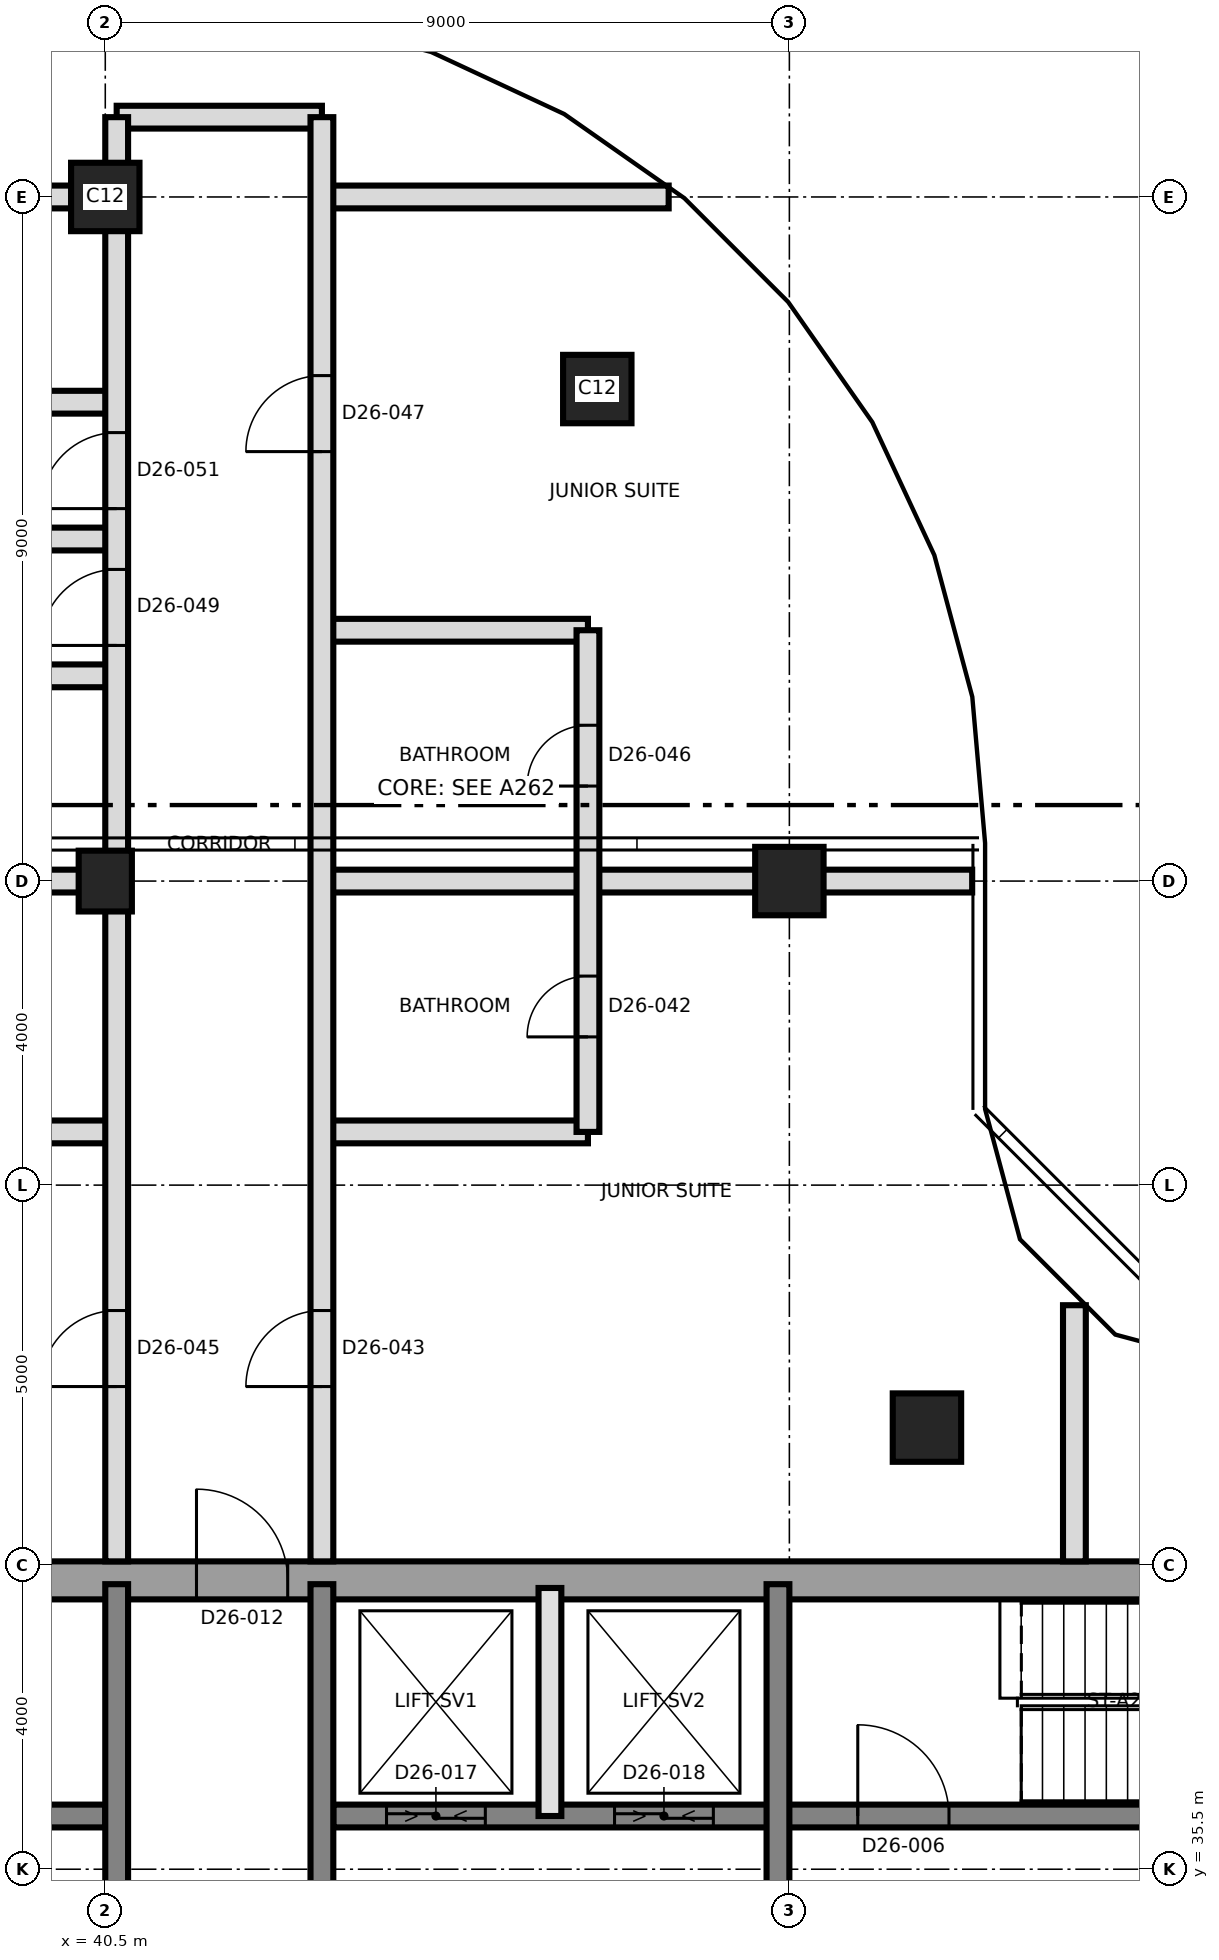
"""IFC4 building model, lengths in metres.
Left out: names, types, materials, properties, quantities, classifications, styles, units other than length and angle.
Written with IfcOpenShell. Run it as: python <this file> out.ifc"""

import sys

from ifc_helpers import new_model, si_unit, direction, frame, frame_2d, origin, origin_2d, place, context, subcontext, project, spatial, rectangle, extrude, element, fill, save


model = new_model("IFC4")
c1 = context("Model", 3, precision=1e-05, world=origin(), true_north=direction((0.0, 1.0)))
c2 = subcontext(c1, "Body", "Model", "MODEL_VIEW")
j1 = project(units=[si_unit("LENGTHUNIT", "METRE"), si_unit("PLANEANGLEUNIT", "RADIAN")], contexts=[c1])
p1 = place(None, origin())
s1 = spatial("IfcSite", under=j1, at=p1, CompositionType="ELEMENT")
p2 = place(p1, origin())
s2 = spatial("IfcBuilding", under=s1, at=p2, CompositionType="ELEMENT")
p3 = place(p2, frame((0.0, 0.0, 236.5)))
s3 = spatial("IfcBuildingStorey", under=s2, at=p3, CompositionType="ELEMENT", Elevation=236.5)
p4 = place(p3, frame((31.25, 39.3, 0.0), z_axis=(0.0, 0.0, 1.0), x_axis=(1.0, 0.0, 0.0)))
e1 = element("IfcWall", 1, at=p4, inside=s3, PredefinedType="SHEAR", context=c2, shape_type="SweptSolid", body=[
    extrude(rectangle(XDim=27.0, YDim=0.5, at=frame_2d((13.5, 0.0))), origin(), (0.0, 0.0, 1.0), 3.7),
])
p5 = place(p4, frame((10.45, 0.0, 0.0)))
e2 = element("IfcOpeningElement", 2, at=p5, cuts=e1, PredefinedType="OPENING", context=c2, shape_type="SweptSolid", body=[
    extrude(rectangle(XDim=1.2, YDim=2.1, at=frame_2d((0.6, 1.05))), frame((0.0, 0.26, 0.0), z_axis=(0.0, -1.0, 0.0), x_axis=(1.0, 0.0, 0.0)), (0.0, 0.0, 1.0), 0.52),
])
p6 = place(p3, frame((31.75, 36.2, 0.0), z_axis=(0.0, 0.0, 1.0), x_axis=(1.0, 0.0, 0.0)))
e3 = element("IfcWall", 3, at=p6, inside=s3, PredefinedType="SHEAR", context=c2, shape_type="SweptSolid", body=[
    extrude(rectangle(XDim=8.75, YDim=0.3, at=frame_2d((4.375, 0.0))), origin(), (0.0, 0.0, 1.0), 3.7),
])
p7 = place(p6, frame((6.65, 0.0, 0.0)))
e4 = element("IfcOpeningElement", 4, at=p7, cuts=e3, PredefinedType="OPENING", context=c2, shape_type="SweptSolid", body=[
    extrude(rectangle(XDim=1.2, YDim=2.1, at=frame_2d((0.6, 1.05))), frame((0.0, 0.16, 0.0), z_axis=(0.0, -1.0, 0.0), x_axis=(1.0, 0.0, 0.0)), (0.0, 0.0, 1.0), 0.32),
])
p8 = place(p3, frame((43.5, 36.2, 0.0), z_axis=(0.0, 0.0, 1.0), x_axis=(1.0, 0.0, 0.0)))
e5 = element("IfcWall", 5, at=p8, inside=s3, PredefinedType="SHEAR", context=c2, shape_type="SweptSolid", body=[
    extrude(rectangle(XDim=14.75, YDim=0.3, at=frame_2d((7.375, 0.0))), origin(), (0.0, 0.0, 1.0), 3.7),
])
p9 = place(p8, frame((6.9, 0.0, 0.0)))
e6 = element("IfcOpeningElement", 6, at=p9, cuts=e5, PredefinedType="OPENING", context=c2, shape_type="SweptSolid", body=[
    extrude(rectangle(XDim=1.2, YDim=2.1, at=frame_2d((0.6, 1.05))), frame((0.0, 0.16, 0.0), z_axis=(0.0, -1.0, 0.0), x_axis=(1.0, 0.0, 0.0)), (0.0, 0.0, 1.0), 0.32),
])
p10 = place(p8, frame((0.7, 0.0, 0.0)))
e7 = element("IfcOpeningElement", 7, at=p10, cuts=e5, PredefinedType="OPENING", context=c2, shape_type="SweptSolid", body=[
    extrude(rectangle(XDim=1.3, YDim=2.4, at=frame_2d((0.65, 1.2))), frame((0.0, 0.16, 0.0), z_axis=(0.0, -1.0, 0.0), x_axis=(1.0, 0.0, 0.0)), (0.0, 0.0, 1.0), 0.32),
])
p11 = place(p8, frame((3.7, 0.0, 0.0)))
e8 = element("IfcOpeningElement", 8, at=p11, cuts=e5, PredefinedType="OPENING", context=c2, shape_type="SweptSolid", body=[
    extrude(rectangle(XDim=1.3, YDim=2.4, at=frame_2d((0.65, 1.2))), frame((0.0, 0.16, 0.0), z_axis=(0.0, -1.0, 0.0), x_axis=(1.0, 0.0, 0.0)), (0.0, 0.0, 1.0), 0.32),
])
for number, where, z_axis, x_axis in (
    (9, (40.65, 33.5, 0.0), (0.0, 0.0, 1.0), (0.0, 1.0, 0.0)),
    (10, (43.35, 33.5, 0.0), (0.0, 0.0, 1.0), (0.0, 1.0, 0.0)),
    (11, (49.35, 33.5, 0.0), (0.0, 0.0, 1.0), (0.0, 1.0, 0.0)),
):
    element("IfcWall", number, at=place(p3, frame(where, z_axis=z_axis, x_axis=x_axis)), inside=s3, PredefinedType="SHEAR", context=c2, shape_type="SweptSolid", body=[
        extrude(rectangle(XDim=5.75, YDim=0.3, at=frame_2d((2.875, 0.0))), origin(), (0.0, 0.0, 1.0), 3.7),
    ])
p12 = place(p3, frame((51.31, 41.31, 0.0), z_axis=(0.0, 0.0, 1.0), x_axis=(1.0, 0.0, 0.0)))
e12 = element("IfcColumn", 12, at=p12, inside=s3, PredefinedType="COLUMN", context=c2, shape_type="SweptSolid", body=[
    extrude(rectangle(XDim=0.9, YDim=0.9, at=origin_2d()), origin(), (0.0, 0.0, 1.0), 3.7),
])
p13 = place(p3, frame((40.5, 48.5, 0.0), z_axis=(0.0, 0.0, 1.0), x_axis=(0.0, 1.0, 0.0)))
e13 = element("IfcColumn", 13, at=p13, inside=s3, PredefinedType="COLUMN", context=c2, shape_type="SweptSolid", body=[
    extrude(rectangle(XDim=0.8, YDim=0.7, at=origin_2d()), origin(), (0.0, 0.0, 1.0), 3.7),
])
for number, where, z_axis, x_axis in (
    (14, (49.5, 48.5, 0.0), (0.0, 0.0, 1.0), (1.0, 0.0, 0.0)),
    (15, (46.973, 54.973, 0.0), (0.0, 0.0, 1.0), (1.0, 0.0, 0.0)),
    (16, (40.5, 57.5, 0.0), (0.0, 0.0, 1.0), (1.0, 0.0, 0.0)),
):
    element("IfcColumn", number, at=place(p3, frame(where, z_axis=z_axis, x_axis=x_axis)), inside=s3, PredefinedType="COLUMN", context=c2, shape_type="SweptSolid", body=[
        extrude(rectangle(XDim=0.9, YDim=0.9, at=origin_2d()), origin(), (0.0, 0.0, 1.0), 3.7),
    ])
p14 = place(p3, frame((46.35, 36.2, 0.0), z_axis=(0.0, 0.0, 1.0), x_axis=(0.0, 1.0, 0.0)))
e17 = element("IfcWall", 17, at=p14, inside=s3, PredefinedType="SOLIDWALL", context=c2, shape_type="SweptSolid", body=[
    extrude(rectangle(XDim=3.0, YDim=0.3, at=frame_2d((1.5, 0.0))), origin(), (0.0, 0.0, 1.0), 3.4),
])
for number, where, z_axis, x_axis in (
    (18, (37.15, 45.2, 0.0), (0.0, 0.0, 1.0), (1.0, 0.0, 0.0)),
    (19, (43.35, 45.2, 0.0), (0.0, 0.0, 1.0), (1.0, 0.0, 0.0)),
):
    element("IfcWall", number, at=place(p3, frame(where, z_axis=z_axis, x_axis=x_axis)), inside=s3, PredefinedType="PARTITIONING", context=c2, shape_type="SweptSolid", body=[
        extrude(rectangle(XDim=3.5, YDim=0.3, at=frame_2d((1.75, 0.0))), origin(), (0.0, 0.0, 1.0), 3.4),
    ])
p15 = place(p3, frame((29.275, 48.5, 0.0), z_axis=(0.0, 0.0, 1.0), x_axis=(1.0, 0.0, 0.0)))
e20 = element("IfcWall", 20, at=p15, inside=s3, PredefinedType="PARTITIONING", context=c2, shape_type="SweptSolid", body=[
    extrude(rectangle(XDim=11.375, YDim=0.3, at=frame_2d((5.688, 0.0))), origin(), (0.0, 0.0, 1.0), 3.4),
])
p16 = place(p3, frame((43.35, 48.5, 0.0), z_axis=(0.0, 0.0, 1.0), x_axis=(1.0, 0.0, 0.0)))
e21 = element("IfcWall", 21, at=p16, inside=s3, PredefinedType="PARTITIONING", context=c2, shape_type="SweptSolid", body=[
    extrude(rectangle(XDim=8.555, YDim=0.3, at=frame_2d((4.277, 0.0))), origin(), (0.0, 0.0, 1.0), 3.4),
])
p17 = place(p3, frame((37.45, 51.2, 0.0), z_axis=(0.0, 0.0, 1.0), x_axis=(1.0, 0.0, 0.0)))
e22 = element("IfcWall", 22, at=p17, inside=s3, PredefinedType="PARTITIONING", context=c2, shape_type="SweptSolid", body=[
    extrude(rectangle(XDim=3.2, YDim=0.3, at=frame_2d((1.6, 0.0))), origin(), (0.0, 0.0, 1.0), 3.4),
])
p18 = place(p3, frame((43.35, 51.8, 0.0), z_axis=(0.0, 0.0, 1.0), x_axis=(1.0, 0.0, 0.0)))
e23 = element("IfcWall", 23, at=p18, inside=s3, PredefinedType="PARTITIONING", context=c2, shape_type="SweptSolid", body=[
    extrude(rectangle(XDim=3.5, YDim=0.3, at=frame_2d((1.75, 0.0))), origin(), (0.0, 0.0, 1.0), 3.4),
])
p19 = place(p3, frame((29.812, 53.0, 0.0), z_axis=(0.0, 0.0, 1.0), x_axis=(1.0, 0.0, 0.0)))
e24 = element("IfcWall", 24, at=p19, inside=s3, PredefinedType="PARTITIONING", context=c2, shape_type="SweptSolid", body=[
    extrude(rectangle(XDim=10.838, YDim=0.3, at=frame_2d((5.419, 0.0))), origin(), (0.0, 0.0, 1.0), 3.4),
])
p20 = place(p3, frame((37.45, 54.8, 0.0), z_axis=(0.0, 0.0, 1.0), x_axis=(1.0, 0.0, 0.0)))
e25 = element("IfcWall", 25, at=p20, inside=s3, PredefinedType="PARTITIONING", context=c2, shape_type="SweptSolid", body=[
    extrude(rectangle(XDim=3.2, YDim=0.3, at=frame_2d((1.6, 0.0))), origin(), (0.0, 0.0, 1.0), 3.4),
])
p21 = place(p3, frame((33.088, 57.5, 0.0), z_axis=(0.0, 0.0, 1.0), x_axis=(1.0, 0.0, 0.0)))
e26 = element("IfcWall", 26, at=p21, inside=s3, PredefinedType="PARTITIONING", context=c2, shape_type="SweptSolid", body=[
    extrude(rectangle(XDim=7.562, YDim=0.3, at=frame_2d((3.781, 0.0))), origin(), (0.0, 0.0, 1.0), 3.4),
])
p22 = place(p3, frame((43.35, 57.5, 0.0), z_axis=(0.0, 0.0, 1.0), x_axis=(1.0, 0.0, 0.0)))
e27 = element("IfcWall", 27, at=p22, inside=s3, PredefinedType="PARTITIONING", context=c2, shape_type="SweptSolid", body=[
    extrude(rectangle(XDim=4.562, YDim=0.3, at=frame_2d((2.281, 0.0))), origin(), (0.0, 0.0, 1.0), 3.4),
])
p23 = place(p3, frame((40.65, 58.55, 0.0), z_axis=(0.0, 0.0, 1.0), x_axis=(1.0, 0.0, 0.0)))
e28 = element("IfcWall", 28, at=p23, inside=s3, PredefinedType="PARTITIONING", context=c2, shape_type="SweptSolid", body=[
    extrude(rectangle(XDim=2.7, YDim=0.3, at=frame_2d((1.35, 0.0))), origin(), (0.0, 0.0, 1.0), 3.4),
])
p24 = place(p3, frame((40.65, 39.55, 0.0), z_axis=(0.0, 0.0, 1.0), x_axis=(0.0, 1.0, 0.0)))
e29 = element("IfcWall", 29, at=p24, inside=s3, PredefinedType="PARTITIONING", context=c2, shape_type="SweptSolid", body=[
    extrude(rectangle(XDim=19.0, YDim=0.3, at=frame_2d((9.5, 0.0))), origin(), (0.0, 0.0, 1.0), 3.4),
])
p25 = place(p24, frame((2.3, 0.0, 0.0)))
e30 = element("IfcOpeningElement", 30, at=p25, cuts=e29, PredefinedType="OPENING", context=c2, shape_type="SweptSolid", body=[
    extrude(rectangle(XDim=1.0, YDim=2.4, at=frame_2d((0.5, 1.2))), frame((0.0, 0.16, 0.0), z_axis=(0.0, -1.0, 0.0), x_axis=(1.0, 0.0, 0.0)), (0.0, 0.0, 1.0), 0.32),
])
p26 = place(p24, frame((12.05, 0.0, 0.0)))
e31 = element("IfcOpeningElement", 31, at=p26, cuts=e29, PredefinedType="OPENING", context=c2, shape_type="SweptSolid", body=[
    extrude(rectangle(XDim=1.0, YDim=2.1, at=frame_2d((0.5, 1.05))), frame((0.0, 0.16, 0.0), z_axis=(0.0, -1.0, 0.0), x_axis=(1.0, 0.0, 0.0)), (0.0, 0.0, 1.0), 0.32),
])
p27 = place(p24, frame((13.85, 0.0, 0.0)))
e32 = element("IfcOpeningElement", 32, at=p27, cuts=e29, PredefinedType="OPENING", context=c2, shape_type="SweptSolid", body=[
    extrude(rectangle(XDim=1.0, YDim=2.1, at=frame_2d((0.5, 1.05))), frame((0.0, 0.16, 0.0), z_axis=(0.0, -1.0, 0.0), x_axis=(1.0, 0.0, 0.0)), (0.0, 0.0, 1.0), 0.32),
])
p28 = place(p3, frame((43.35, 39.55, 0.0), z_axis=(0.0, 0.0, 1.0), x_axis=(0.0, 1.0, 0.0)))
e33 = element("IfcWall", 33, at=p28, inside=s3, PredefinedType="PARTITIONING", context=c2, shape_type="SweptSolid", body=[
    extrude(rectangle(XDim=19.0, YDim=0.3, at=frame_2d((9.5, 0.0))), origin(), (0.0, 0.0, 1.0), 3.4),
])
p29 = place(p28, frame((2.3, 0.0, 0.0)))
e34 = element("IfcOpeningElement", 34, at=p29, cuts=e33, PredefinedType="OPENING", context=c2, shape_type="SweptSolid", body=[
    extrude(rectangle(XDim=1.0, YDim=2.4, at=frame_2d((0.5, 1.2))), frame((0.0, 0.16, 0.0), z_axis=(0.0, -1.0, 0.0), x_axis=(1.0, 0.0, 0.0)), (0.0, 0.0, 1.0), 0.32),
])
p30 = place(p28, frame((14.6, 0.0, 0.0)))
e35 = element("IfcOpeningElement", 35, at=p30, cuts=e33, PredefinedType="OPENING", context=c2, shape_type="SweptSolid", body=[
    extrude(rectangle(XDim=1.0, YDim=2.4, at=frame_2d((0.5, 1.2))), frame((0.0, 0.16, 0.0), z_axis=(0.0, -1.0, 0.0), x_axis=(1.0, 0.0, 0.0)), (0.0, 0.0, 1.0), 0.32),
])
p31 = place(p3, frame((46.85, 45.2, 0.0), z_axis=(0.0, 0.0, 1.0), x_axis=(0.0, 1.0, 0.0)))
e36 = element("IfcWall", 36, at=p31, inside=s3, PredefinedType="PARTITIONING", context=c2, shape_type="SweptSolid", body=[
    extrude(rectangle(XDim=6.6, YDim=0.3, at=frame_2d((3.3, 0.0))), origin(), (0.0, 0.0, 1.0), 3.4),
])
p32 = place(p31, frame((1.25, 0.0, 0.0)))
e37 = element("IfcOpeningElement", 37, at=p32, cuts=e36, PredefinedType="OPENING", context=c2, shape_type="SweptSolid", body=[
    extrude(rectangle(XDim=0.8, YDim=2.1, at=frame_2d((0.4, 1.05))), frame((0.0, 0.16, 0.0), z_axis=(0.0, -1.0, 0.0), x_axis=(1.0, 0.0, 0.0)), (0.0, 0.0, 1.0), 0.32),
])
p33 = place(p31, frame((4.55, 0.0, 0.0)))
e38 = element("IfcOpeningElement", 38, at=p33, cuts=e36, PredefinedType="OPENING", context=c2, shape_type="SweptSolid", body=[
    extrude(rectangle(XDim=0.8, YDim=2.1, at=frame_2d((0.4, 1.05))), frame((0.0, 0.16, 0.0), z_axis=(0.0, -1.0, 0.0), x_axis=(1.0, 0.0, 0.0)), (0.0, 0.0, 1.0), 0.32),
])
p34 = place(p3, frame((53.25, 39.55, 0.0), z_axis=(0.0, 0.0, 1.0), x_axis=(0.0, 1.0, 0.0)))
e39 = element("IfcWall", 39, at=p34, inside=s3, PredefinedType="PARTITIONING", context=c2, shape_type="SweptSolid", body=[
    extrude(rectangle(XDim=3.37, YDim=0.3, at=frame_2d((1.685, 0.0))), origin(), (0.0, 0.0, 1.0), 3.4),
])
p35 = place(p9, origin())
e40 = element("IfcDoor", 40, at=p35, inside=s3, OperationType="SINGLE_SWING_LEFT", PredefinedType="DOOR", context=c2, shape_type="SweptSolid", body=[
    extrude(rectangle(XDim=1.2, YDim=2.1, at=frame_2d((0.6, 1.05))), frame((0.0, 0.025, 0.0), z_axis=(0.0, -1.0, 0.0), x_axis=(1.0, 0.0, 0.0)), (0.0, 0.0, 1.0), 0.05),
])
fill(e6, e40)
p36 = place(p5, origin())
e41 = element("IfcDoor", 41, at=p36, inside=s3, OperationType="SINGLE_SWING_RIGHT", PredefinedType="DOOR", context=c2, shape_type="SweptSolid", body=[
    extrude(rectangle(XDim=1.2, YDim=2.1, at=frame_2d((0.6, 1.05))), frame((0.0, 0.025, 0.0), z_axis=(0.0, -1.0, 0.0), x_axis=(1.0, 0.0, 0.0)), (0.0, 0.0, 1.0), 0.05),
])
fill(e2, e41)
p37 = place(p10, origin())
e42 = element("IfcDoor", 42, at=p37, inside=s3, OperationType="SLIDING_TO_LEFT", PredefinedType="DOOR", context=c2, shape_type="SweptSolid", body=[
    extrude(rectangle(XDim=1.3, YDim=2.4, at=frame_2d((0.65, 1.2))), frame((0.0, 0.025, 0.0), z_axis=(0.0, -1.0, 0.0), x_axis=(1.0, 0.0, 0.0)), (0.0, 0.0, 1.0), 0.05),
])
fill(e7, e42)
p38 = place(p11, origin())
e43 = element("IfcDoor", 43, at=p38, inside=s3, OperationType="SLIDING_TO_LEFT", PredefinedType="DOOR", context=c2, shape_type="SweptSolid", body=[
    extrude(rectangle(XDim=1.3, YDim=2.4, at=frame_2d((0.65, 1.2))), frame((0.0, 0.025, 0.0), z_axis=(0.0, -1.0, 0.0), x_axis=(1.0, 0.0, 0.0)), (0.0, 0.0, 1.0), 0.05),
])
fill(e8, e43)
p39 = place(p32, origin())
e44 = element("IfcDoor", 44, at=p39, inside=s3, OperationType="SINGLE_SWING_RIGHT", PredefinedType="DOOR", context=c2, shape_type="SweptSolid", body=[
    extrude(rectangle(XDim=0.8, YDim=2.1, at=frame_2d((0.4, 1.05))), frame((0.0, 0.025, 0.0), z_axis=(0.0, -1.0, 0.0), x_axis=(1.0, 0.0, 0.0)), (0.0, 0.0, 1.0), 0.05),
])
fill(e37, e44)
p40 = place(p29, origin())
e45 = element("IfcDoor", 45, at=p40, inside=s3, OperationType="SINGLE_SWING_LEFT", PredefinedType="DOOR", context=c2, shape_type="SweptSolid", body=[
    extrude(rectangle(XDim=1.0, YDim=2.4, at=frame_2d((0.5, 1.2))), frame((0.0, 0.025, 0.0), z_axis=(0.0, -1.0, 0.0), x_axis=(1.0, 0.0, 0.0)), (0.0, 0.0, 1.0), 0.05),
])
fill(e34, e45)
p41 = place(p25, origin())
e46 = element("IfcDoor", 46, at=p41, inside=s3, OperationType="SINGLE_SWING_LEFT", PredefinedType="DOOR", context=c2, shape_type="SweptSolid", body=[
    extrude(rectangle(XDim=1.0, YDim=2.4, at=frame_2d((0.5, 1.2))), frame((0.0, 0.025, 0.0), z_axis=(0.0, -1.0, 0.0), x_axis=(1.0, 0.0, 0.0)), (0.0, 0.0, 1.0), 0.05),
])
fill(e30, e46)
p42 = place(p33, origin())
e47 = element("IfcDoor", 47, at=p42, inside=s3, OperationType="SINGLE_SWING_LEFT", PredefinedType="DOOR", context=c2, shape_type="SweptSolid", body=[
    extrude(rectangle(XDim=0.8, YDim=2.1, at=frame_2d((0.4, 1.05))), frame((0.0, 0.025, 0.0), z_axis=(0.0, -1.0, 0.0), x_axis=(1.0, 0.0, 0.0)), (0.0, 0.0, 1.0), 0.05),
])
fill(e38, e47)
p43 = place(p30, origin())
e48 = element("IfcDoor", 48, at=p43, inside=s3, OperationType="SINGLE_SWING_RIGHT", PredefinedType="DOOR", context=c2, shape_type="SweptSolid", body=[
    extrude(rectangle(XDim=1.0, YDim=2.4, at=frame_2d((0.5, 1.2))), frame((0.0, 0.025, 0.0), z_axis=(0.0, -1.0, 0.0), x_axis=(1.0, 0.0, 0.0)), (0.0, 0.0, 1.0), 0.05),
])
fill(e35, e48)
p44 = place(p26, origin())
e49 = element("IfcDoor", 49, at=p44, inside=s3, OperationType="SINGLE_SWING_LEFT", PredefinedType="DOOR", context=c2, shape_type="SweptSolid", body=[
    extrude(rectangle(XDim=1.0, YDim=2.1, at=frame_2d((0.5, 1.05))), frame((0.0, 0.025, 0.0), z_axis=(0.0, -1.0, 0.0), x_axis=(1.0, 0.0, 0.0)), (0.0, 0.0, 1.0), 0.05),
])
fill(e31, e49)
p45 = place(p27, origin())
e50 = element("IfcDoor", 50, at=p45, inside=s3, OperationType="SINGLE_SWING_LEFT", PredefinedType="DOOR", context=c2, shape_type="SweptSolid", body=[
    extrude(rectangle(XDim=1.0, YDim=2.1, at=frame_2d((0.5, 1.05))), frame((0.0, 0.025, 0.0), z_axis=(0.0, -1.0, 0.0), x_axis=(1.0, 0.0, 0.0)), (0.0, 0.0, 1.0), 0.05),
])
fill(e32, e50)
save(model, sys.argv[1])
